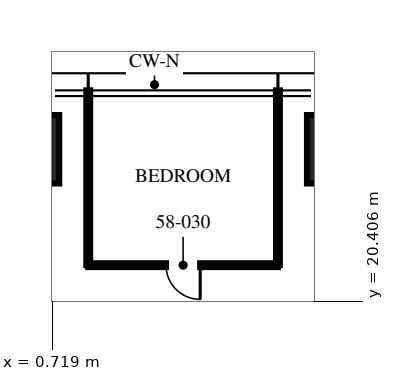
"""IFC4 building model, lengths in metres.
Left out: names, types, materials, properties, quantities, classifications, styles, units other than length and angle.
Written with IfcOpenShell. Run it as: python <this file> out.ifc"""

import sys

from ifc_helpers import new_model, si_unit, direction, frame, frame_2d, origin, origin_2d, place, context, subcontext, project, spatial, rectangle, extrude, element, fill, save


model = new_model("IFC4")
c1 = context("Model", 3, precision=1e-05, world=origin(), true_north=direction((0.0, 1.0)))
c2 = subcontext(c1, "Body", "Model", "MODEL_VIEW")
j1 = project(units=[si_unit("LENGTHUNIT", "METRE"), si_unit("PLANEANGLEUNIT", "RADIAN")], contexts=[c1])
p1 = place(None, origin())
s1 = spatial("IfcSite", under=j1, at=p1, CompositionType="ELEMENT")
p2 = place(p1, origin())
s2 = spatial("IfcBuilding", under=s1, at=p2, CompositionType="ELEMENT")
p3 = place(p2, frame((0.0, 0.0, 233.25)))
s3 = spatial("IfcBuildingStorey", under=s2, at=p3, CompositionType="ELEMENT", Elevation=233.25)
for number, where, z_axis, x_axis in (
    (1, (0.0, 24.4, 0.0), (0.0, 0.0, 1.0), (1.0, 0.0, 0.0)),
    (2, (8.32, 24.4, 0.0), (0.0, 0.0, 1.0), (1.0, 0.0, 0.0)),
):
    element("IfcColumn", number, at=place(p3, frame(where, z_axis=z_axis, x_axis=x_axis)), inside=s3, PredefinedType="COLUMN", context=c2, shape_type="SweptSolid", body=[
        extrude(rectangle(XDim=1.8, YDim=1.8, at=origin_2d()), origin(), (0.0, 0.0, 1.0), 3.75),
    ])
for number, where, z_axis, x_axis in (
    (3, (6.656, 21.35, 0.0), (0.0, 0.0, 1.0), (0.0, 1.0, 0.0)),
    (4, (1.664, 21.35, 0.0), (0.0, 0.0, 1.0), (0.0, 1.0, 0.0)),
):
    element("IfcWall", number, at=place(p3, frame(where, z_axis=z_axis, x_axis=x_axis)), inside=s3, PredefinedType="PARTITIONING", context=c2, shape_type="SweptSolid", body=[
        extrude(rectangle(XDim=4.6, YDim=0.1, at=frame_2d((2.3, 0.0))), origin(), (0.0, 0.0, 1.0), 2.91),
    ])
p4 = place(p3, frame((6.656, 21.35, 0.0), z_axis=(0.0, 0.0, 1.0), x_axis=(-1.0, 0.0, 0.0)))
e5 = element("IfcWall", 5, at=p4, inside=s3, PredefinedType="PARTITIONING", context=c2, shape_type="SweptSolid", body=[
    extrude(rectangle(XDim=4.992, YDim=0.1, at=frame_2d((2.496, 0.0))), origin(), (0.0, 0.0, 1.0), 2.81),
])
p5 = place(p4, frame((2.046, 0.0, 0.0)))
e6 = element("IfcOpeningElement", 6, at=p5, cuts=e5, PredefinedType="OPENING", context=c2, shape_type="SweptSolid", body=[
    extrude(rectangle(XDim=0.9, YDim=2.1, at=frame_2d((0.45, 1.05))), frame((0.0, 0.06, 0.0), z_axis=(0.0, -1.0, 0.0), x_axis=(1.0, 0.0, 0.0)), (0.0, 0.0, 1.0), 0.12),
])
p6 = place(p5, origin())
e7 = element("IfcDoor", 7, at=p6, inside=s3, OperationType="SINGLE_SWING_LEFT", PredefinedType="DOOR", context=c2, shape_type="SweptSolid", body=[
    extrude(rectangle(XDim=0.9, YDim=2.1, at=frame_2d((0.45, 1.05))), frame((0.0, 0.025, 0.0), z_axis=(0.0, -1.0, 0.0), x_axis=(1.0, 0.0, 0.0)), (0.0, 0.0, 1.0), 0.05),
])
fill(e6, e7)
save(model, sys.argv[1])
